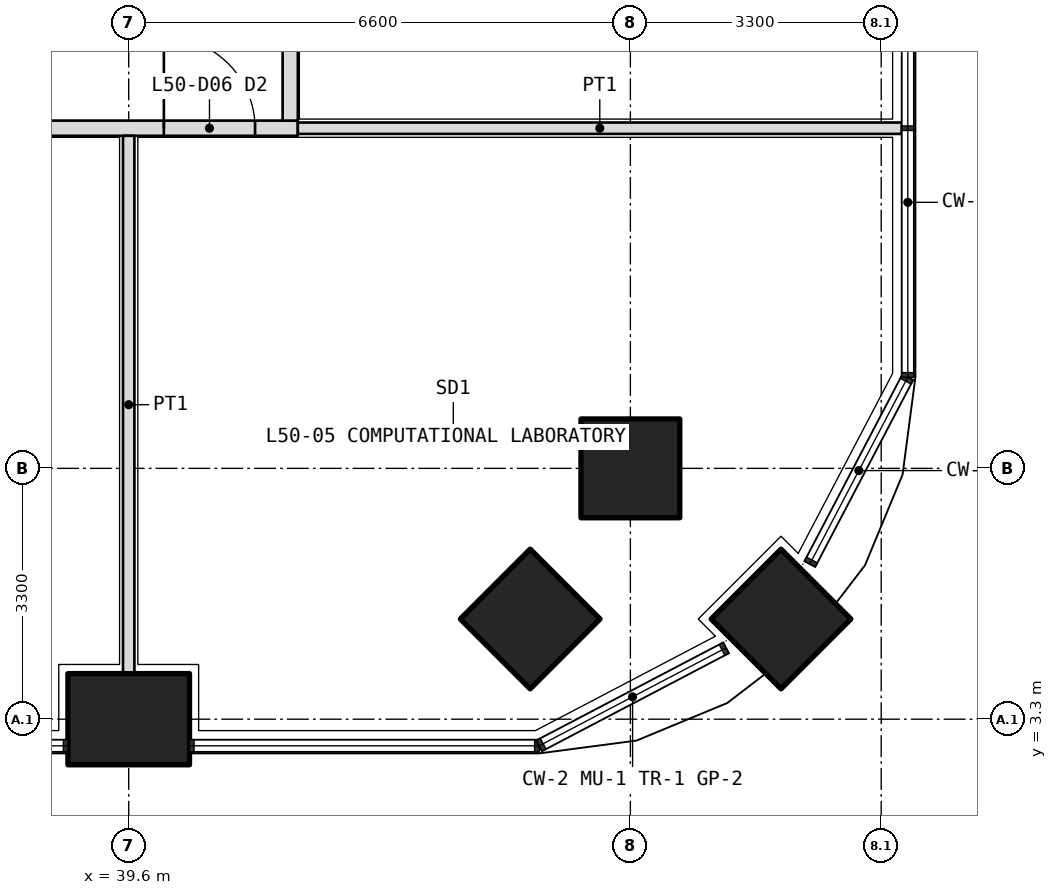
"""IFC4 building model, lengths in metres.
Left out: names, types, materials, properties, quantities, classifications, styles, units other than length and angle.
Written with IfcOpenShell. Run it as: python <this file> out.ifc"""

import sys

from ifc_helpers import new_model, si_unit, direction, frame, frame_2d, origin, origin_2d, place, context, subcontext, project, spatial, rectangle, extrude, element, fill, save


model = new_model("IFC4")
c1 = context("Model", 3, precision=1e-05, world=origin(), true_north=direction((0.0, 1.0)))
c2 = subcontext(c1, "Body", "Model", "MODEL_VIEW")
j1 = project(units=[si_unit("LENGTHUNIT", "METRE"), si_unit("PLANEANGLEUNIT", "RADIAN")], contexts=[c1])
p1 = place(None, origin())
s1 = spatial("IfcSite", under=j1, at=p1, CompositionType="ELEMENT")
p2 = place(p1, origin())
s2 = spatial("IfcBuilding", under=s1, at=p2, CompositionType="ELEMENT")
p3 = place(p2, frame((0.0, 0.0, 218.7)))
s3 = spatial("IfcBuildingStorey", under=s2, at=p3, CompositionType="ELEMENT", Elevation=218.7)
p4 = place(p3, frame((48.182, 4.618, 0.0), z_axis=(0.0, 0.0, 1.0), x_axis=(0.707106781187, 0.707106781187, 0.0)))
e1 = element("IfcColumn", 1, at=p4, inside=s3, PredefinedType="COLUMN", context=c2, shape_type="SweptSolid", body=[
    extrude(rectangle(XDim=1.3, YDim=1.3, at=origin_2d()), origin(), (0.0, 0.0, 1.0), 4.2),
])
p5 = place(p3, frame((39.6, 3.3, 0.0), z_axis=(0.0, 0.0, 1.0), x_axis=(1.0, 0.0, 0.0)))
e2 = element("IfcColumn", 2, at=p5, inside=s3, PredefinedType="COLUMN", context=c2, shape_type="SweptSolid", body=[
    extrude(rectangle(XDim=1.6, YDim=1.2, at=origin_2d()), origin(), (0.0, 0.0, 1.0), 4.2),
])
for number, where, z_axis, x_axis in (
    (3, (46.2, 6.6, 0.0), (0.0, 0.0, 1.0), (1.0, 0.0, 0.0)),
    (4, (44.882, 4.618, 0.0), (0.0, 0.0, 1.0), (0.707, 0.707, 0.0)),
):
    element("IfcColumn", number, at=place(p3, frame(where, z_axis=z_axis, x_axis=x_axis)), inside=s3, PredefinedType="COLUMN", context=c2, shape_type="SweptSolid", body=[
        extrude(rectangle(XDim=1.3, YDim=1.3, at=origin_2d()), origin(), (0.0, 0.0, 1.0), 4.2),
    ])
p6 = place(p3, frame((26.4, 11.075, 0.0), z_axis=(0.0, 0.0, 1.0), x_axis=(1.0, 0.0, 0.0)))
e5 = element("IfcWall", 5, at=p6, inside=s3, PredefinedType="PARTITIONING", context=c2, shape_type="SweptSolid", body=[
    extrude(rectangle(XDim=15.425, YDim=0.2, at=frame_2d((7.712, 0.0))), origin(), (0.0, 0.0, 1.0), 2.55),
])
p7 = place(p6, frame((6.1, 0.0, 0.0)))
e6 = element("IfcOpeningElement", 6, at=p7, cuts=e5, PredefinedType="OPENING", context=c2, shape_type="SweptSolid", body=[
    extrude(rectangle(XDim=1.0, YDim=2.1, at=frame_2d((0.5, 1.05))), frame((0.0, 0.11, 0.0), z_axis=(0.0, -1.0, 0.0), x_axis=(1.0, 0.0, 0.0)), (0.0, 0.0, 1.0), 0.22),
])
p8 = place(p6, frame((13.663, 0.0, 0.0)))
e7 = element("IfcOpeningElement", 7, at=p8, cuts=e5, PredefinedType="OPENING", context=c2, shape_type="SweptSolid", body=[
    extrude(rectangle(XDim=1.2, YDim=2.1, at=frame_2d((0.6, 1.05))), frame((0.0, 0.11, 0.0), z_axis=(0.0, -1.0, 0.0), x_axis=(1.0, 0.0, 0.0)), (0.0, 0.0, 1.0), 0.22),
])
p9 = place(p3, frame((41.725, 11.175, 0.0), z_axis=(0.0, 0.0, 1.0), x_axis=(0.0, 1.0, 0.0)))
e8 = element("IfcWall", 8, at=p9, inside=s3, PredefinedType="PARTITIONING", context=c2, shape_type="SweptSolid", body=[
    extrude(rectangle(XDim=23.85, YDim=0.2, at=frame_2d((11.925, 0.0))), origin(), (0.0, 0.0, 1.0), 2.55),
])
p10 = place(p9, frame((3.762, 0.0, 0.0)))
e9 = element("IfcOpeningElement", 9, at=p10, cuts=e8, PredefinedType="OPENING", context=c2, shape_type="SweptSolid", body=[
    extrude(rectangle(XDim=1.0, YDim=2.1, at=frame_2d((0.5, 1.05))), frame((0.0, 0.11, 0.0), z_axis=(0.0, -1.0, 0.0), x_axis=(1.0, 0.0, 0.0)), (0.0, 0.0, 1.0), 0.22),
])
p11 = place(p9, frame((9.625, 0.0, 0.0)))
e10 = element("IfcOpeningElement", 10, at=p11, cuts=e8, PredefinedType="OPENING", context=c2, shape_type="SweptSolid", body=[
    extrude(rectangle(XDim=1.0, YDim=2.1, at=frame_2d((0.5, 1.05))), frame((0.0, 0.11, 0.0), z_axis=(0.0, -1.0, 0.0), x_axis=(1.0, 0.0, 0.0)), (0.0, 0.0, 1.0), 0.22),
])
p12 = place(p9, frame((12.975, 0.0, 0.0)))
e11 = element("IfcOpeningElement", 11, at=p12, cuts=e8, PredefinedType="OPENING", context=c2, shape_type="SweptSolid", body=[
    extrude(rectangle(XDim=0.9, YDim=2.1, at=frame_2d((0.45, 1.05))), frame((0.0, 0.11, 0.0), z_axis=(0.0, -1.0, 0.0), x_axis=(1.0, 0.0, 0.0)), (0.0, 0.0, 1.0), 0.22),
])
p13 = place(p9, frame((19.087, 0.0, 0.0)))
e12 = element("IfcOpeningElement", 12, at=p13, cuts=e8, PredefinedType="OPENING", context=c2, shape_type="SweptSolid", body=[
    extrude(rectangle(XDim=1.0, YDim=2.1, at=frame_2d((0.5, 1.05))), frame((0.0, 0.11, 0.0), z_axis=(0.0, -1.0, 0.0), x_axis=(1.0, 0.0, 0.0)), (0.0, 0.0, 1.0), 0.22),
])
p14 = place(p3, frame((49.77, 11.075, 0.0), z_axis=(0.0, 0.0, 1.0), x_axis=(-1.0, 0.0, 0.0)))
e13 = element("IfcWall", 13, at=p14, inside=s3, PredefinedType="PARTITIONING", context=c2, shape_type="SweptSolid", body=[
    extrude(rectangle(XDim=7.945, YDim=0.15, at=frame_2d((3.973, 0.0))), origin(), (0.0, 0.0, 1.0), 3.85),
])
p15 = place(p3, frame((39.6, 3.9, 0.0), z_axis=(0.0, 0.0, 1.0), x_axis=(0.0, 1.0, 0.0)))
e14 = element("IfcWall", 14, at=p15, inside=s3, PredefinedType="PARTITIONING", context=c2, shape_type="SweptSolid", body=[
    extrude(rectangle(XDim=7.075, YDim=0.15, at=frame_2d((3.538, 0.0))), origin(), (0.0, 0.0, 1.0), 2.55),
])
p16 = place(p8, origin())
e15 = element("IfcDoor", 15, at=p16, inside=s3, OperationType="DOUBLE_DOOR_SINGLE_SWING", PredefinedType="DOOR", context=c2, shape_type="SweptSolid", body=[
    extrude(rectangle(XDim=1.2, YDim=2.1, at=frame_2d((0.6, 1.05))), frame((0.0, 0.025, 0.0), z_axis=(0.0, -1.0, 0.0), x_axis=(1.0, 0.0, 0.0)), (0.0, 0.0, 1.0), 0.05),
])
fill(e7, e15)
save(model, sys.argv[1])
